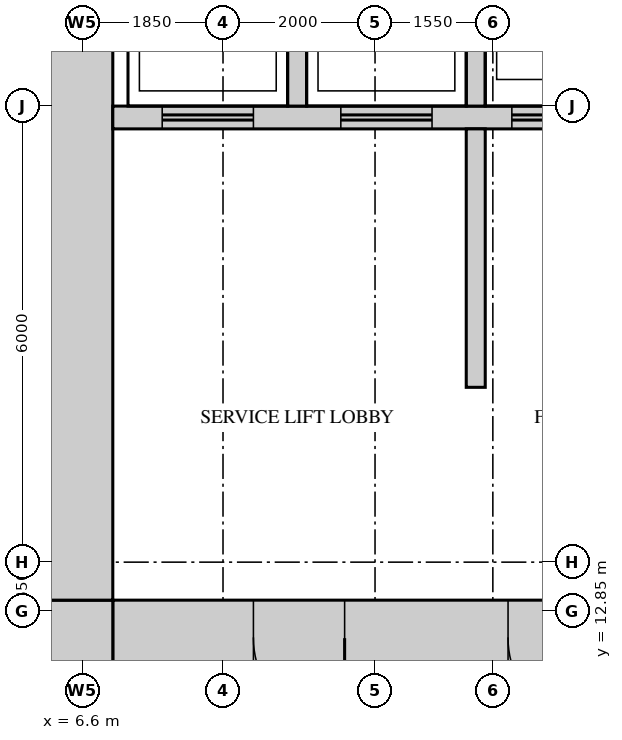
"""IFC4 building model, lengths in metres.
Left out: names, types, materials, properties, quantities, classifications, styles, units other than length and angle.
Written with IfcOpenShell. Run it as: python <this file> out.ifc"""

import sys

from ifc_helpers import new_model, si_unit, direction, frame, frame_2d, origin, place, context, subcontext, project, spatial, rectangle, extrude, source, transform, mapped, element, fill, save


model = new_model("IFC4")
c1 = context("Model", 3, precision=1e-05, world=origin(), true_north=direction((0.0, 1.0)))
c2 = subcontext(c1, "Body", "Model", "MODEL_VIEW")
j1 = project(units=[si_unit("LENGTHUNIT", "METRE"), si_unit("PLANEANGLEUNIT", "RADIAN")], contexts=[c1])
p1 = place(None, origin())
s1 = spatial("IfcSite", under=j1, at=p1, CompositionType="ELEMENT")
p2 = place(p1, origin())
s2 = spatial("IfcBuilding", under=s1, at=p2, CompositionType="ELEMENT")
p3 = place(p2, frame((0.0, 0.0, 149.9)))
s3 = spatial("IfcBuildingStorey", under=s2, at=p3, CompositionType="ELEMENT", Elevation=149.9)
m1 = source(origin(), c2, "Body", "SweptSolid", [
    extrude(rectangle(XDim=6.9, YDim=1.0, at=frame_2d((3.45, 0.0))), origin(), (0.0, 0.0, 1.0), 4.1),
])
p4 = place(p3, frame((7.0, 12.5, 0.0), z_axis=(0.0, 0.0, 1.0), x_axis=(1.0, 0.0, 0.0)))
e1 = element("IfcWall", 1, at=p4, inside=s3, PredefinedType="SHEAR", context=c2, shape_type="MappedRepresentation", body=[
    mapped(m1, transform((0.0, 0.0, 0.0))),
])
m2 = source(origin(), c2, "Body", "SweptSolid", [
    extrude(rectangle(XDim=1.2, YDim=2.1, at=frame_2d((0.6, 1.05))), frame((0.0, 0.51, 0.0), z_axis=(0.0, -1.0, 0.0), x_axis=(1.0, 0.0, 0.0)), (0.0, 0.0, 1.0), 1.02),
])
p5 = place(p4, frame((5.2, 0.0, 0.0)))
e2 = element("IfcOpeningElement", 2, at=p5, cuts=e1, PredefinedType="OPENING", context=c2, shape_type="MappedRepresentation", body=[
    mapped(m2, transform((0.0, 0.0, 0.0))),
])
p6 = place(p4, frame((1.85, 0.0, 0.0)))
e3 = element("IfcOpeningElement", 3, at=p6, cuts=e1, PredefinedType="OPENING", context=c2, shape_type="MappedRepresentation", body=[
    mapped(m2, transform((0.0, 0.0, 0.0))),
])
m3 = source(origin(), c2, "Body", "SweptSolid", [
    extrude(rectangle(XDim=1.0, YDim=1.0, at=frame_2d((0.5, 0.0))), origin(), (0.0, 0.0, 1.0), 4.1),
])
p7 = place(p3, frame((6.0, 12.5, 0.0), z_axis=(0.0, 0.0, 1.0), x_axis=(1.0, 0.0, 0.0)))
e4 = element("IfcWall", 4, at=p7, inside=s3, PredefinedType="SHEAR", context=c2, shape_type="MappedRepresentation", body=[
    mapped(m3, transform((0.0, 0.0, 0.0))),
])
m4 = source(origin(), c2, "Body", "SweptSolid", [
    extrude(rectangle(XDim=28.0, YDim=1.0, at=frame_2d((14.0, 0.0))), origin(), (0.0, 0.0, 1.0), 4.1),
])
p8 = place(p3, frame((6.5, 13.0, 0.0), z_axis=(0.0, 0.0, 1.0), x_axis=(0.0, 1.0, 0.0)))
e5 = element("IfcWall", 5, at=p8, inside=s3, PredefinedType="SHEAR", context=c2, shape_type="MappedRepresentation", body=[
    mapped(m4, transform((0.0, 0.0, 0.0))),
])
m5 = source(origin(), c2, "Body", "SweptSolid", [
    extrude(rectangle(XDim=9.075, YDim=0.3, at=frame_2d((4.538, 0.0))), origin(), (0.0, 0.0, 1.0), 4.1),
])
p9 = place(p3, frame((7.0, 19.35, 0.0), z_axis=(0.0, 0.0, 1.0), x_axis=(1.0, 0.0, 0.0)))
e6 = element("IfcWall", 6, at=p9, inside=s3, PredefinedType="STANDARD", context=c2, shape_type="MappedRepresentation", body=[
    mapped(m5, transform((0.0, 0.0, 0.0))),
])
m6 = source(origin(), c2, "Body", "SweptSolid", [
    extrude(rectangle(XDim=1.2, YDim=2.1, at=frame_2d((0.6, 1.05))), frame((0.0, 0.16, 0.0), z_axis=(0.0, -1.0, 0.0), x_axis=(1.0, 0.0, 0.0)), (0.0, 0.0, 1.0), 0.32),
])
p10 = place(p9, frame((0.65, 0.0, 0.0)))
e7 = element("IfcOpeningElement", 7, at=p10, cuts=e6, PredefinedType="OPENING", context=c2, shape_type="MappedRepresentation", body=[
    mapped(m6, transform((0.0, 0.0, 0.0))),
])
p11 = place(p9, frame((3.0, 0.0, 0.0)))
e8 = element("IfcOpeningElement", 8, at=p11, cuts=e6, PredefinedType="OPENING", context=c2, shape_type="MappedRepresentation", body=[
    mapped(m6, transform((0.0, 0.0, 0.0))),
])
p12 = place(p9, frame((5.25, 0.0, 0.0)))
e9 = element("IfcOpeningElement", 9, at=p12, cuts=e6, PredefinedType="OPENING", context=c2, shape_type="MappedRepresentation", body=[
    mapped(m6, transform((0.0, 0.0, 0.0))),
])
p13 = place(p9, frame((7.4, 0.0, 0.0)))
e10 = element("IfcOpeningElement", 10, at=p13, cuts=e6, PredefinedType="OPENING", context=c2, shape_type="MappedRepresentation", body=[
    mapped(m6, transform((0.0, 0.0, 0.0))),
])
m7 = source(origin(), c2, "Body", "SweptSolid", [
    extrude(rectangle(XDim=3.1, YDim=0.25, at=frame_2d((1.55, 0.0))), origin(), (0.0, 0.0, 1.0), 4.1),
])
for number, where, z_axis, x_axis in (
    (11, (9.425, 19.5, 0.0), (0.0, 0.0, 1.0), (0.0, 1.0, 0.0)),
    (12, (11.775, 19.5, 0.0), (0.0, 0.0, 1.0), (0.0, 1.0, 0.0)),
):
    element("IfcWall", number, at=place(p3, frame(where, z_axis=z_axis, x_axis=x_axis)), inside=s3, PredefinedType="STANDARD", context=c2, shape_type="MappedRepresentation", body=[
        mapped(m7, transform((0.0, 0.0, 0.0))),
    ])
m8 = source(origin(), c2, "Body", "SweptSolid", [
    extrude(rectangle(XDim=3.4, YDim=0.25, at=frame_2d((1.7, 0.0))), origin(), (0.0, 0.0, 1.0), 4.1),
])
p14 = place(p3, frame((11.775, 15.8, 0.0), z_axis=(0.0, 0.0, 1.0), x_axis=(0.0, 1.0, 0.0)))
e13 = element("IfcWall", 13, at=p14, inside=s3, PredefinedType="STANDARD", context=c2, shape_type="MappedRepresentation", body=[
    mapped(m8, transform((0.0, 0.0, 0.0))),
])
m9 = source(origin(), c2, "Body", "SweptSolid", [
    extrude(rectangle(XDim=1.2, YDim=2.1, at=frame_2d((0.6, 1.05))), frame((0.0, 0.45, 0.0), z_axis=(0.0, -1.0, 0.0), x_axis=(1.0, 0.0, 0.0)), (0.0, 0.0, 1.0), 0.9),
])
p15 = place(p5, origin())
e14 = element("IfcDoor", 14, at=p15, inside=s3, OperationType="SINGLE_SWING_RIGHT", PredefinedType="DOOR", context=c2, shape_type="MappedRepresentation", body=[
    mapped(m9, transform((0.0, 0.0, 0.0))),
])
fill(e2, e14)
p16 = place(p6, origin())
e15 = element("IfcDoor", 15, at=p16, inside=s3, OperationType="SINGLE_SWING_RIGHT", PredefinedType="DOOR", context=c2, shape_type="MappedRepresentation", body=[
    mapped(m9, transform((0.0, 0.0, 0.0))),
])
fill(e3, e15)
m10 = source(origin(), c2, "Body", "SweptSolid", [
    extrude(rectangle(XDim=1.2, YDim=2.1, at=frame_2d((0.6, 1.05))), frame((0.0, 0.025, 0.0), z_axis=(0.0, -1.0, 0.0), x_axis=(1.0, 0.0, 0.0)), (0.0, 0.0, 1.0), 0.05),
])
p17 = place(p10, origin())
e16 = element("IfcDoor", 16, at=p17, inside=s3, OperationType="DOUBLE_DOOR_SLIDING", PredefinedType="DOOR", context=c2, shape_type="MappedRepresentation", body=[
    mapped(m10, transform((0.0, 0.0, 0.0))),
])
fill(e7, e16)
p18 = place(p11, origin())
e17 = element("IfcDoor", 17, at=p18, inside=s3, OperationType="DOUBLE_DOOR_SLIDING", PredefinedType="DOOR", context=c2, shape_type="MappedRepresentation", body=[
    mapped(m10, transform((0.0, 0.0, 0.0))),
])
fill(e8, e17)
p19 = place(p12, origin())
e18 = element("IfcDoor", 18, at=p19, inside=s3, OperationType="DOUBLE_DOOR_SLIDING", PredefinedType="DOOR", context=c2, shape_type="MappedRepresentation", body=[
    mapped(m10, transform((0.0, 0.0, 0.0))),
])
fill(e9, e18)
save(model, sys.argv[1])
